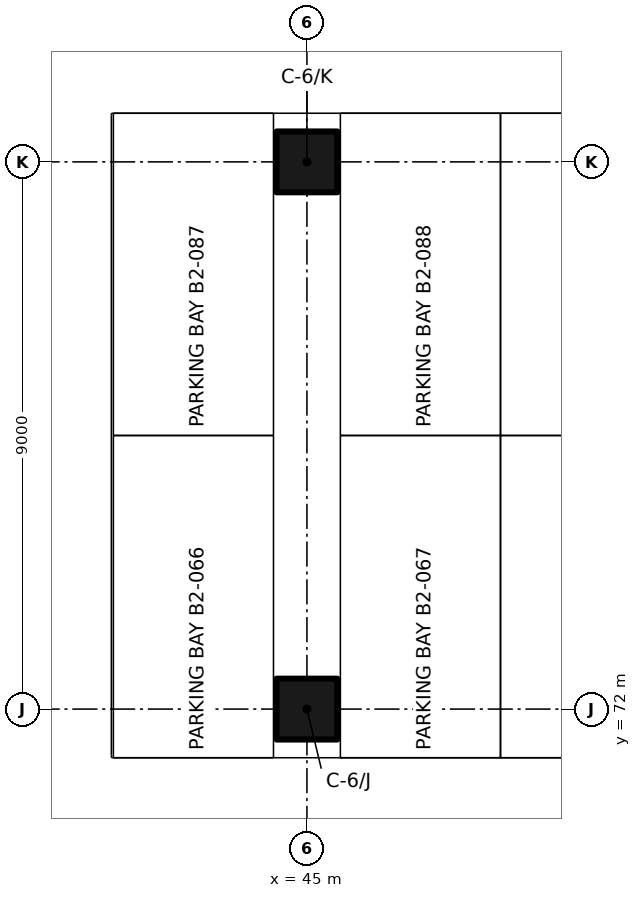
"""IFC4 building model, lengths in metres.
Left out: names, types, materials, properties, quantities, classifications, styles, units other than length and angle.
Written with IfcOpenShell. Run it as: python <this file> out.ifc"""

import sys

from ifc_helpers import new_model, si_unit, direction, frame, origin, origin_2d, place, context, subcontext, project, spatial, rectangle, extrude, element, save


model = new_model("IFC4")
c1 = context("Model", 3, precision=1e-05, world=origin(), true_north=direction((0.0, 1.0)))
c2 = subcontext(c1, "Body", "Model", "MODEL_VIEW")
j1 = project(units=[si_unit("LENGTHUNIT", "METRE"), si_unit("PLANEANGLEUNIT", "RADIAN")], contexts=[c1])
p1 = place(None, origin())
s1 = spatial("IfcSite", under=j1, at=p1, CompositionType="ELEMENT")
p2 = place(p1, origin())
s2 = spatial("IfcBuilding", under=s1, at=p2, CompositionType="ELEMENT")
p3 = place(p2, frame((0.0, 0.0, -9.9)))
s3 = spatial("IfcBuildingStorey", under=s2, at=p3, CompositionType="ELEMENT", Elevation=-9.9)
for number, where, z_axis, x_axis in (
    (1, (45.0, 72.0, 0.0), (0.0, 0.0, 1.0), (1.0, 0.0, 0.0)),
    (2, (45.0, 81.0, 0.0), (0.0, 0.0, 1.0), (1.0, 0.0, 0.0)),
):
    element("IfcColumn", number, at=place(p3, frame(where, z_axis=z_axis, x_axis=x_axis)), inside=s3, PredefinedType="COLUMN", context=c2, shape_type="SweptSolid", body=[
        extrude(rectangle(XDim=1.0, YDim=1.0, at=origin_2d()), origin(), (0.0, 0.0, 1.0), 4.8),
    ])
save(model, sys.argv[1])
